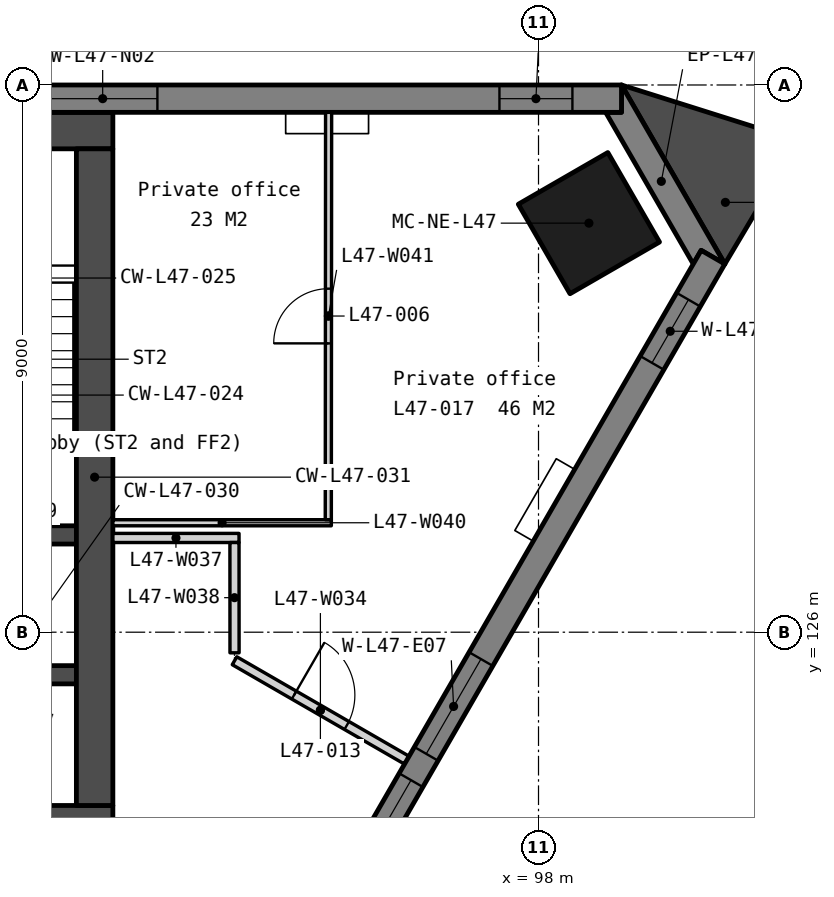
"""IFC4 building model, lengths in metres.
Left out: names, types, materials, properties, quantities, classifications, styles, units other than length and angle.
Written with IfcOpenShell. Run it as: python <this file> out.ifc"""

import sys

from ifc_helpers import new_model, si_unit, direction, frame, frame_2d, origin, origin_2d, place, context, subcontext, project, spatial, polyline, rectangle, outline, extrude, element, fill, save


model = new_model("IFC4")
c1 = context("Model", 3, precision=1e-05, world=origin(), true_north=direction((0.0, 1.0)))
c2 = subcontext(c1, "Body", "Model", "MODEL_VIEW")
j1 = project(units=[si_unit("LENGTHUNIT", "METRE"), si_unit("PLANEANGLEUNIT", "RADIAN")], contexts=[c1])
p1 = place(None, origin())
s1 = spatial("IfcSite", under=j1, at=p1, CompositionType="ELEMENT")
p2 = place(p1, origin())
s2 = spatial("IfcBuilding", under=s1, at=p2, CompositionType="ELEMENT")
p3 = place(p2, frame((0.0, 0.0, 188.0)))
s3 = spatial("IfcBuildingStorey", under=s2, at=p3, CompositionType="ELEMENT", Elevation=188.0)
p4 = place(p3, frame((98.829, 132.728, 0.0), z_axis=(0.0, 0.0, 1.0), x_axis=(-0.5, 0.866025403784, 0.0)))
e1 = element("IfcColumn", 1, at=p4, inside=s3, PredefinedType="COLUMN", context=c2, shape_type="SweptSolid", body=[
    extrude(rectangle(XDim=1.7, YDim=1.7, at=origin_2d()), origin(), (0.0, 0.0, 1.0), 3.9),
])
p5 = place(p3, frame((69.0, 134.25, 0.0), z_axis=(0.0, 0.0, 1.0), x_axis=(1.0, 0.0, 0.0)))
e2 = element("IfcWall", 2, at=p5, inside=s3, PredefinedType="SOLIDWALL", context=c2, shape_type="SweptSolid", body=[
    extrude(rectangle(XDim=22.0, YDim=0.6, at=frame_2d((11.0, 0.0))), origin(), (0.0, 0.0, 1.0), 3.75),
])
p6 = place(p3, frame((69.0, 122.85, 0.0), z_axis=(0.0, 0.0, 1.0), x_axis=(1.0, 0.0, 0.0)))
e3 = element("IfcWall", 3, at=p6, inside=s3, PredefinedType="SOLIDWALL", context=c2, shape_type="SweptSolid", body=[
    extrude(rectangle(XDim=22.0, YDim=0.6, at=frame_2d((11.0, 0.0))), origin(), (0.0, 0.0, 1.0), 3.75),
])
p7 = place(p6, frame((16.375, 0.0, 0.0)))
e4 = element("IfcOpeningElement", 4, at=p7, cuts=e3, PredefinedType="OPENING", context=c2, shape_type="SweptSolid", body=[
    extrude(rectangle(XDim=1.8, YDim=2.1, at=frame_2d((0.9, 1.05))), frame((0.0, 0.31, 0.0), z_axis=(0.0, -1.0, 0.0), x_axis=(1.0, 0.0, 0.0)), (0.0, 0.0, 1.0), 0.62),
])
p8 = place(p6, frame((3.825, 0.0, 0.0)))
e5 = element("IfcOpeningElement", 5, at=p8, cuts=e3, PredefinedType="OPENING", context=c2, shape_type="SweptSolid", body=[
    extrude(rectangle(XDim=1.8, YDim=2.1, at=frame_2d((0.9, 1.05))), frame((0.0, 0.31, 0.0), z_axis=(0.0, -1.0, 0.0), x_axis=(1.0, 0.0, 0.0)), (0.0, 0.0, 1.0), 0.62),
])
p9 = place(p6, frame((12.85, 0.0, 0.0)))
e6 = element("IfcOpeningElement", 6, at=p9, cuts=e3, PredefinedType="OPENING", context=c2, shape_type="SweptSolid", body=[
    extrude(rectangle(XDim=1.5, YDim=2.1, at=frame_2d((0.75, 1.05))), frame((0.0, 0.31, 0.0), z_axis=(0.0, -1.0, 0.0), x_axis=(1.0, 0.0, 0.0)), (0.0, 0.0, 1.0), 0.62),
])
for number, where, z_axis, x_axis in (
    (7, (87.85, 127.6, 0.0), (0.0, 0.0, 1.0), (1.0, 0.0, 0.0)),
    (8, (87.85, 125.3, 0.0), (0.0, 0.0, 1.0), (1.0, 0.0, 0.0)),
):
    element("IfcWall", number, at=place(p3, frame(where, z_axis=z_axis, x_axis=x_axis)), inside=s3, PredefinedType="SOLIDWALL", context=c2, shape_type="SweptSolid", body=[
        extrude(rectangle(XDim=2.55, YDim=0.3, at=frame_2d((1.275, 0.0))), origin(), (0.0, 0.0, 1.0), 3.75),
    ])
p10 = place(p3, frame((90.7, 133.95, 0.0), z_axis=(0.0, 0.0, 1.0), x_axis=(0.0, -1.0, 0.0)))
e9 = element("IfcWall", 9, at=p10, inside=s3, PredefinedType="SOLIDWALL", context=c2, shape_type="SweptSolid", body=[
    extrude(rectangle(XDim=10.8, YDim=0.6, at=frame_2d((5.4, 0.0))), origin(), (0.0, 0.0, 1.0), 3.75),
])
p11 = place(p3, frame((0.0, 0.0, -0.15)))
e10 = element("IfcWall", 10, at=p11, inside=s3, PredefinedType="SOLIDWALL", context=c2, shape_type="SweptSolid", body=[
    extrude(outline(polyline([(101.065, 132.055), (100.675, 132.281), (100.545, 132.055), (99.105, 134.55), (99.365, 134.55), (99.365, 135.0), (101.065, 132.055)])), origin(), (0.0, 0.0, 1.0), 3.9),
])
p12 = place(p3, frame((99.365, 134.775, -0.15), z_axis=(0.0, 0.0, 1.0), x_axis=(-1.0, 0.0, 0.0)))
e11 = element("IfcWall", 11, at=p12, inside=s3, PredefinedType="SOLIDWALL", context=c2, shape_type="SweptSolid", body=[
    extrude(outline(polyline([(38.729, 0.0), (38.729, 3.9), (0.0, 3.9), (0.0, 0.0), (38.729, 0.0)])), frame((0.0, 0.225, 0.0), z_axis=(0.0, -1.0, 0.0), x_axis=(1.0, 0.0, 0.0)), (0.0, 0.0, 1.0), 0.45),
])
p13 = place(p12, frame((0.807, 0.0, 0.95)))
e12 = element("IfcOpeningElement", 12, at=p13, cuts=e11, PredefinedType="OPENING", context=c2, shape_type="SweptSolid", body=[
    extrude(rectangle(XDim=1.2, YDim=2.2, at=frame_2d((0.6, 1.1))), frame((0.0, 0.235, 0.0), z_axis=(0.0, -1.0, 0.0), x_axis=(1.0, 0.0, 0.0)), (0.0, 0.0, 1.0), 0.47),
])
p14 = place(p12, frame((7.632, 0.0, 0.95)))
e13 = element("IfcOpeningElement", 13, at=p14, cuts=e11, PredefinedType="OPENING", context=c2, shape_type="SweptSolid", body=[
    extrude(rectangle(XDim=1.8, YDim=2.2, at=frame_2d((0.9, 1.1))), frame((0.0, 0.235, 0.0), z_axis=(0.0, -1.0, 0.0), x_axis=(1.0, 0.0, 0.0)), (0.0, 0.0, 1.0), 0.47),
])
p15 = place(p12, frame((9.932, 0.0, 0.95)))
e14 = element("IfcOpeningElement", 14, at=p15, cuts=e11, PredefinedType="OPENING", context=c2, shape_type="SweptSolid", body=[
    extrude(rectangle(XDim=1.8, YDim=2.2, at=frame_2d((0.9, 1.1))), frame((0.0, 0.235, 0.0), z_axis=(0.0, -1.0, 0.0), x_axis=(1.0, 0.0, 0.0)), (0.0, 0.0, 1.0), 0.47),
])
p16 = place(p12, frame((17.315, 0.0, 0.95)))
e15 = element("IfcOpeningElement", 15, at=p16, cuts=e11, PredefinedType="OPENING", context=c2, shape_type="SweptSolid", body=[
    extrude(rectangle(XDim=1.8, YDim=2.2, at=frame_2d((0.9, 1.1))), frame((0.0, 0.235, 0.0), z_axis=(0.0, -1.0, 0.0), x_axis=(1.0, 0.0, 0.0)), (0.0, 0.0, 1.0), 0.47),
])
p17 = place(p12, frame((19.615, 0.0, 0.95)))
e16 = element("IfcOpeningElement", 16, at=p17, cuts=e11, PredefinedType="OPENING", context=c2, shape_type="SweptSolid", body=[
    extrude(rectangle(XDim=1.8, YDim=2.2, at=frame_2d((0.9, 1.1))), frame((0.0, 0.235, 0.0), z_axis=(0.0, -1.0, 0.0), x_axis=(1.0, 0.0, 0.0)), (0.0, 0.0, 1.0), 0.47),
])
p18 = place(p12, frame((26.997, 0.0, 0.95)))
e17 = element("IfcOpeningElement", 17, at=p18, cuts=e11, PredefinedType="OPENING", context=c2, shape_type="SweptSolid", body=[
    extrude(rectangle(XDim=1.8, YDim=2.2, at=frame_2d((0.9, 1.1))), frame((0.0, 0.235, 0.0), z_axis=(0.0, -1.0, 0.0), x_axis=(1.0, 0.0, 0.0)), (0.0, 0.0, 1.0), 0.47),
])
p19 = place(p12, frame((29.297, 0.0, 0.95)))
e18 = element("IfcOpeningElement", 18, at=p19, cuts=e11, PredefinedType="OPENING", context=c2, shape_type="SweptSolid", body=[
    extrude(rectangle(XDim=1.8, YDim=2.2, at=frame_2d((0.9, 1.1))), frame((0.0, 0.235, 0.0), z_axis=(0.0, -1.0, 0.0), x_axis=(1.0, 0.0, 0.0)), (0.0, 0.0, 1.0), 0.47),
])
p20 = place(p12, frame((36.722, 0.0, 0.95)))
e19 = element("IfcOpeningElement", 19, at=p20, cuts=e11, PredefinedType="OPENING", context=c2, shape_type="SweptSolid", body=[
    extrude(rectangle(XDim=1.2, YDim=2.2, at=frame_2d((0.6, 1.1))), frame((0.0, 0.235, 0.0), z_axis=(0.0, -1.0, 0.0), x_axis=(1.0, 0.0, 0.0)), (0.0, 0.0, 1.0), 0.47),
])
p21 = place(p3, frame((81.505, 98.627, -0.15), z_axis=(0.0, 0.0, 1.0), x_axis=(0.500002199942, 0.866024133644, 0.0)))
e20 = element("IfcWall", 20, at=p21, inside=s3, PredefinedType="SOLIDWALL", context=c2, shape_type="SweptSolid", body=[
    extrude(outline(polyline([(38.729, 0.0), (38.729, 3.9), (0.0, 3.9), (0.0, 0.0), (38.729, 0.0)])), frame((0.0, 0.225, 0.0), z_axis=(0.0, -1.0, 0.0), x_axis=(1.0, 0.0, 0.0)), (0.0, 0.0, 1.0), 0.45),
])
p22 = place(p21, frame((0.807, 0.0, 0.95)))
e21 = element("IfcOpeningElement", 21, at=p22, cuts=e20, PredefinedType="OPENING", context=c2, shape_type="SweptSolid", body=[
    extrude(rectangle(XDim=1.2, YDim=2.2, at=frame_2d((0.6, 1.1))), frame((0.0, 0.235, 0.0), z_axis=(0.0, -1.0, 0.0), x_axis=(1.0, 0.0, 0.0)), (0.0, 0.0, 1.0), 0.47),
])
p23 = place(p21, frame((7.632, 0.0, 0.95)))
e22 = element("IfcOpeningElement", 22, at=p23, cuts=e20, PredefinedType="OPENING", context=c2, shape_type="SweptSolid", body=[
    extrude(rectangle(XDim=1.8, YDim=2.2, at=frame_2d((0.9, 1.1))), frame((0.0, 0.235, 0.0), z_axis=(0.0, -1.0, 0.0), x_axis=(1.0, 0.0, 0.0)), (0.0, 0.0, 1.0), 0.47),
])
p24 = place(p21, frame((9.932, 0.0, 0.95)))
e23 = element("IfcOpeningElement", 23, at=p24, cuts=e20, PredefinedType="OPENING", context=c2, shape_type="SweptSolid", body=[
    extrude(rectangle(XDim=1.8, YDim=2.2, at=frame_2d((0.9, 1.1))), frame((0.0, 0.235, 0.0), z_axis=(0.0, -1.0, 0.0), x_axis=(1.0, 0.0, 0.0)), (0.0, 0.0, 1.0), 0.47),
])
p25 = place(p21, frame((17.315, 0.0, 0.95)))
e24 = element("IfcOpeningElement", 24, at=p25, cuts=e20, PredefinedType="OPENING", context=c2, shape_type="SweptSolid", body=[
    extrude(rectangle(XDim=1.8, YDim=2.2, at=frame_2d((0.9, 1.1))), frame((0.0, 0.235, 0.0), z_axis=(0.0, -1.0, 0.0), x_axis=(1.0, 0.0, 0.0)), (0.0, 0.0, 1.0), 0.47),
])
p26 = place(p21, frame((19.615, 0.0, 0.95)))
e25 = element("IfcOpeningElement", 25, at=p26, cuts=e20, PredefinedType="OPENING", context=c2, shape_type="SweptSolid", body=[
    extrude(rectangle(XDim=1.8, YDim=2.2, at=frame_2d((0.9, 1.1))), frame((0.0, 0.235, 0.0), z_axis=(0.0, -1.0, 0.0), x_axis=(1.0, 0.0, 0.0)), (0.0, 0.0, 1.0), 0.47),
])
p27 = place(p21, frame((26.997, 0.0, 0.95)))
e26 = element("IfcOpeningElement", 26, at=p27, cuts=e20, PredefinedType="OPENING", context=c2, shape_type="SweptSolid", body=[
    extrude(rectangle(XDim=1.8, YDim=2.2, at=frame_2d((0.9, 1.1))), frame((0.0, 0.235, 0.0), z_axis=(0.0, -1.0, 0.0), x_axis=(1.0, 0.0, 0.0)), (0.0, 0.0, 1.0), 0.47),
])
p28 = place(p21, frame((29.297, 0.0, 0.95)))
e27 = element("IfcOpeningElement", 27, at=p28, cuts=e20, PredefinedType="OPENING", context=c2, shape_type="SweptSolid", body=[
    extrude(rectangle(XDim=1.8, YDim=2.2, at=frame_2d((0.9, 1.1))), frame((0.0, 0.235, 0.0), z_axis=(0.0, -1.0, 0.0), x_axis=(1.0, 0.0, 0.0)), (0.0, 0.0, 1.0), 0.47),
])
p29 = place(p21, frame((36.722, 0.0, 0.95)))
e28 = element("IfcOpeningElement", 28, at=p29, cuts=e20, PredefinedType="OPENING", context=c2, shape_type="SweptSolid", body=[
    extrude(rectangle(XDim=1.2, YDim=2.2, at=frame_2d((0.6, 1.1))), frame((0.0, 0.235, 0.0), z_axis=(0.0, -1.0, 0.0), x_axis=(1.0, 0.0, 0.0)), (0.0, 0.0, 1.0), 0.47),
])
p30 = place(p3, frame((0.0, 0.0, -0.15)))
e29 = element("IfcWall", 29, at=p30, inside=s3, PredefinedType="SOLIDWALL", context=c2, shape_type="SweptSolid", body=[
    extrude(outline(polyline([(101.065, 132.055), (102.27, 134.083), (99.365, 135.0), (101.065, 132.055)])), origin(), (0.0, 0.0, 1.0), 3.9),
])
p31 = place(p3, frame((93.001, 125.531, 0.0), z_axis=(0.0, 0.0, 1.0), x_axis=(0.866032230194, -0.499988176125, 0.0)))
e30 = element("IfcWall", 30, at=p31, inside=s3, PredefinedType="PARTITIONING", context=c2, shape_type="SweptSolid", body=[
    extrude(rectangle(XDim=3.261, YDim=0.15, at=frame_2d((1.63, 0.0))), origin(), (0.0, 0.0, 1.0), 3.75),
])
p32 = place(p31, frame((1.13, 0.0, 0.0)))
e31 = element("IfcOpeningElement", 31, at=p32, cuts=e30, PredefinedType="OPENING", context=c2, shape_type="SweptSolid", body=[
    extrude(rectangle(XDim=1.0, YDim=2.1, at=frame_2d((0.5, 1.05))), frame((0.0, 0.085, 0.0), z_axis=(0.0, -1.0, 0.0), x_axis=(1.0, 0.0, 0.0)), (0.0, 0.0, 1.0), 0.17),
])
p33 = place(p3, frame((91.0, 127.55, 0.0), z_axis=(0.0, 0.0, 1.0), x_axis=(1.0, 0.0, 0.0)))
e32 = element("IfcWall", 32, at=p33, inside=s3, PredefinedType="PARTITIONING", context=c2, shape_type="SweptSolid", body=[
    extrude(rectangle(XDim=2.075, YDim=0.15, at=frame_2d((1.038, 0.0))), origin(), (0.0, 0.0, 1.0), 3.75),
])
p34 = place(p3, frame((93.001, 125.661, 0.0), z_axis=(0.0, 0.0, 1.0), x_axis=(-0.000538285483, 0.999999855124, 0.0)))
e33 = element("IfcWall", 33, at=p34, inside=s3, PredefinedType="PARTITIONING", context=c2, shape_type="SweptSolid", body=[
    extrude(rectangle(XDim=1.814, YDim=0.15, at=frame_2d((0.907, 0.0))), origin(), (0.0, 0.0, 1.0), 3.75),
])
p35 = place(p3, frame((91.0, 127.8, 0.0), z_axis=(0.0, 0.0, 1.0), x_axis=(1.0, 0.0, 0.0)))
e34 = element("IfcWall", 34, at=p35, inside=s3, PredefinedType="PARTITIONING", context=c2, shape_type="SweptSolid", body=[
    extrude(rectangle(XDim=3.593, YDim=0.1, at=frame_2d((1.796, 0.0))), origin(), (0.0, 0.0, 1.0), 3.28),
])
p36 = place(p3, frame((94.543, 127.85, 0.0), z_axis=(0.0, 0.0, 1.0), x_axis=(0.000728783103, 0.999999734438, 0.0)))
e35 = element("IfcWall", 35, at=p36, inside=s3, PredefinedType="PARTITIONING", context=c2, shape_type="SweptSolid", body=[
    extrude(rectangle(XDim=6.7, YDim=0.1, at=frame_2d((3.35, 0.0))), origin(), (0.0, 0.0, 1.0), 3.75),
])
p37 = place(p36, frame((2.9, 0.0, 0.0)))
e36 = element("IfcOpeningElement", 36, at=p37, cuts=e35, PredefinedType="OPENING", context=c2, shape_type="SweptSolid", body=[
    extrude(rectangle(XDim=0.9, YDim=2.1, at=frame_2d((0.45, 1.05))), frame((0.0, 0.06, 0.0), z_axis=(0.0, -1.0, 0.0), x_axis=(1.0, 0.0, 0.0)), (0.0, 0.0, 1.0), 0.12),
])
p38 = place(p13, origin())
e37 = element("IfcWindow", 37, at=p38, inside=s3, PartitioningType="SINGLE_PANEL", PredefinedType="WINDOW", context=c2, shape_type="SweptSolid", body=[
    extrude(rectangle(XDim=1.2, YDim=2.2, at=frame_2d((0.6, 1.1))), frame((0.0, 0.03, 0.0), z_axis=(0.0, -1.0, 0.0), x_axis=(1.0, 0.0, 0.0)), (0.0, 0.0, 1.0), 0.06),
])
fill(e12, e37)
p39 = place(p14, origin())
e38 = element("IfcWindow", 38, at=p39, inside=s3, PartitioningType="SINGLE_PANEL", PredefinedType="WINDOW", context=c2, shape_type="SweptSolid", body=[
    extrude(rectangle(XDim=1.8, YDim=2.2, at=frame_2d((0.9, 1.1))), frame((0.0, 0.03, 0.0), z_axis=(0.0, -1.0, 0.0), x_axis=(1.0, 0.0, 0.0)), (0.0, 0.0, 1.0), 0.06),
])
fill(e13, e38)
p40 = place(p27, origin())
e39 = element("IfcWindow", 39, at=p40, inside=s3, PartitioningType="SINGLE_PANEL", PredefinedType="WINDOW", context=c2, shape_type="SweptSolid", body=[
    extrude(rectangle(XDim=1.8, YDim=2.2, at=frame_2d((0.9, 1.1))), frame((0.0, 0.03, 0.0), z_axis=(0.0, -1.0, 0.0), x_axis=(1.0, 0.0, 0.0)), (0.0, 0.0, 1.0), 0.06),
])
fill(e26, e39)
p41 = place(p28, origin())
e40 = element("IfcWindow", 40, at=p41, inside=s3, PartitioningType="SINGLE_PANEL", PredefinedType="WINDOW", context=c2, shape_type="SweptSolid", body=[
    extrude(rectangle(XDim=1.8, YDim=2.2, at=frame_2d((0.9, 1.1))), frame((0.0, 0.03, 0.0), z_axis=(0.0, -1.0, 0.0), x_axis=(1.0, 0.0, 0.0)), (0.0, 0.0, 1.0), 0.06),
])
fill(e27, e40)
p42 = place(p29, origin())
e41 = element("IfcWindow", 41, at=p42, inside=s3, PartitioningType="SINGLE_PANEL", PredefinedType="WINDOW", context=c2, shape_type="SweptSolid", body=[
    extrude(rectangle(XDim=1.2, YDim=2.2, at=frame_2d((0.6, 1.1))), frame((0.0, 0.03, 0.0), z_axis=(0.0, -1.0, 0.0), x_axis=(1.0, 0.0, 0.0)), (0.0, 0.0, 1.0), 0.06),
])
fill(e28, e41)
p43 = place(p37, origin())
e42 = element("IfcDoor", 42, at=p43, inside=s3, OperationType="SINGLE_SWING_LEFT", PredefinedType="DOOR", context=c2, shape_type="SweptSolid", body=[
    extrude(rectangle(XDim=0.9, YDim=2.1, at=frame_2d((0.45, 1.05))), frame((0.0, 0.025, 0.0), z_axis=(0.0, -1.0, 0.0), x_axis=(1.0, 0.0, 0.0)), (0.0, 0.0, 1.0), 0.05),
])
fill(e36, e42)
p44 = place(p32, origin())
e43 = element("IfcDoor", 43, at=p44, inside=s3, OperationType="SINGLE_SWING_LEFT", PredefinedType="DOOR", context=c2, shape_type="SweptSolid", body=[
    extrude(rectangle(XDim=1.0, YDim=2.1, at=frame_2d((0.5, 1.05))), frame((0.0, 0.025, 0.0), z_axis=(0.0, -1.0, 0.0), x_axis=(1.0, 0.0, 0.0)), (0.0, 0.0, 1.0), 0.05),
])
fill(e31, e43)
save(model, sys.argv[1])
